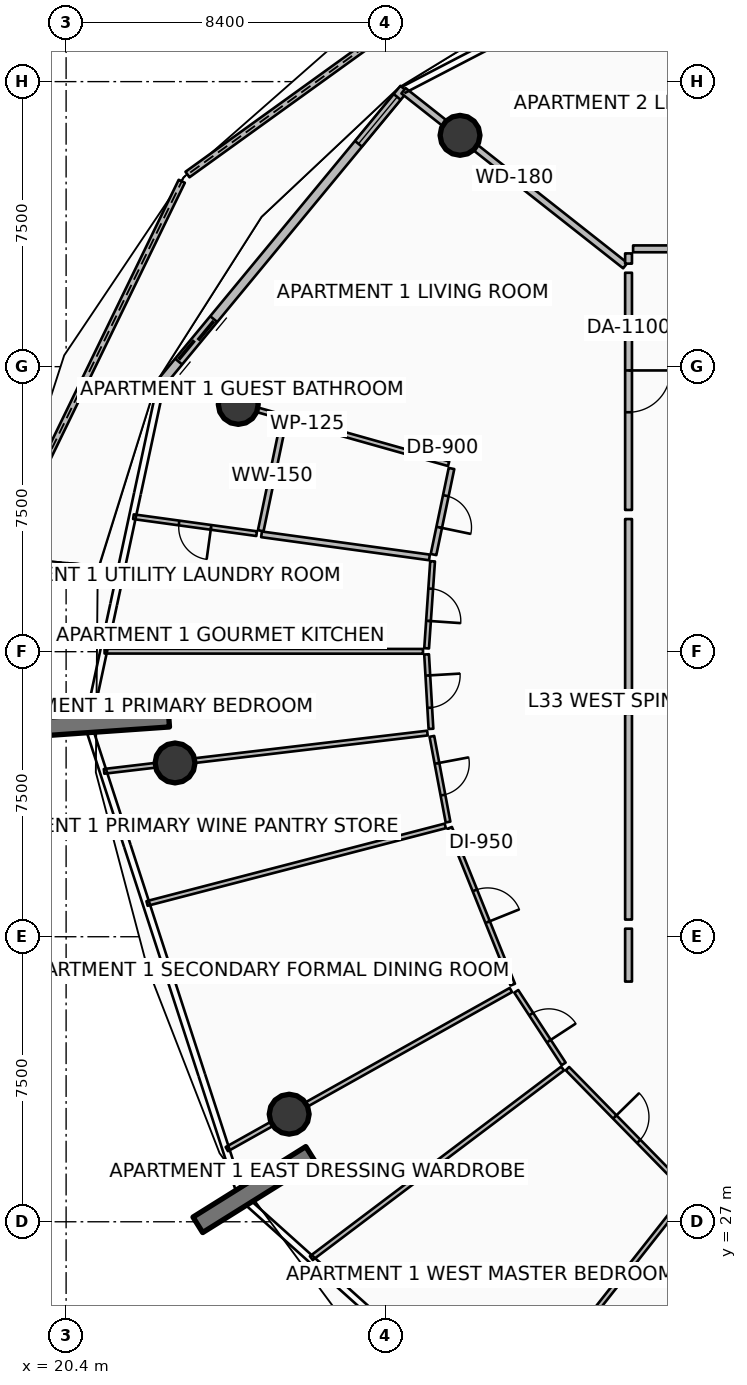
"""IFC4 building model, lengths in metres.
Left out: names, types, materials, properties, quantities, classifications, styles, units other than length and angle.
Written with IfcOpenShell. Run it as: python <this file> out.ifc"""

import sys

from ifc_helpers import new_model, si_unit, direction, frame, frame_2d, origin, origin_2d, place, context, subcontext, project, spatial, polyline, rectangle, circle, outline, extrude, element, fill, save


model = new_model("IFC4")
c1 = context("Model", 3, precision=1e-05, world=origin(), true_north=direction((0.0, 1.0)))
c2 = subcontext(c1, "Body", "Model", "MODEL_VIEW")
j1 = project(units=[si_unit("LENGTHUNIT", "METRE"), si_unit("PLANEANGLEUNIT", "RADIAN")], contexts=[c1])
p1 = place(None, origin())
s1 = spatial("IfcSite", under=j1, at=p1, CompositionType="ELEMENT")
p2 = place(p1, origin())
s2 = spatial("IfcBuilding", under=s1, at=p2, CompositionType="ELEMENT")
p3 = place(p2, frame((0.0, 0.0, 135.3)))
s3 = spatial("IfcBuildingStorey", under=s2, at=p3, CompositionType="ELEMENT", Elevation=135.3)
for number, where, z_axis, x_axis in (
    (1, (23.103, 40.259, 0.0), (0.0, 0.0, 1.0), (-0.998, -0.07, 0.0)),
    (2, (26.835, 28.774, 0.0), (0.0, 0.0, 1.0), (-0.848, -0.53, 0.0)),
):
    element("IfcWall", number, at=place(p3, frame(where, z_axis=z_axis, x_axis=x_axis)), inside=s3, PredefinedType="SOLIDWALL", context=c2, shape_type="SweptSolid", body=[
        extrude(rectangle(XDim=3.5, YDim=0.48, at=frame_2d((1.75, 0.0))), origin(), (0.0, 0.0, 1.0), 3.75),
    ])
for number, where, z_axis, x_axis in (
    (3, (30.766, 55.586, 0.0), (0.0, 0.0, 1.0), (1.0, 0.0, 0.0)),
    (4, (24.93, 48.506, 0.0), (0.0, 0.0, 1.0), (1.0, 0.0, 0.0)),
    (5, (23.267, 39.073, 0.0), (0.0, 0.0, 1.0), (1.0, 0.0, 0.0)),
    (6, (26.27, 29.831, 0.0), (0.0, 0.0, 1.0), (1.0, 0.0, 0.0)),
):
    element("IfcColumn", number, at=place(p3, frame(where, z_axis=z_axis, x_axis=x_axis)), inside=s3, PredefinedType="COLUMN", context=c2, shape_type="SweptSolid", body=[
        extrude(circle(Radius=0.525, at=origin_2d()), origin(), (0.0, 0.0, 1.0), 3.5),
    ])
p4 = place(p3, frame((31.942, 60.57, 0.0), z_axis=(0.0, 0.0, 1.0), x_axis=(-0.811363748486, -0.584541587608, 0.0)))
e7 = element("IfcWall", 7, at=p4, inside=s3, PredefinedType="PARAPET", context=c2, shape_type="SweptSolid", body=[
    extrude(outline(polyline([(0.0, 0.0), (10.29, 0.0), (10.29, 1.632), (5.145, 1.418), (0.0, 1.233), (0.0, 0.0)])), frame((0.0, 0.09, 0.0), z_axis=(0.0, -1.0, 0.0), x_axis=(1.0, 0.0, 0.0)), (0.0, 0.0, 1.0), 0.18),
])
p5 = place(p3, frame((23.444, 54.377, 0.0), z_axis=(0.0, 0.0, 1.0), x_axis=(-0.437208925246, -0.899359970026, 0.0)))
e8 = element("IfcWall", 8, at=p5, inside=s3, PredefinedType="PARAPET", context=c2, shape_type="SweptSolid", body=[
    extrude(outline(polyline([(0.0, 0.0), (10.992, 0.0), (10.992, 1.86), (5.496, 1.798), (0.0, 1.632), (0.0, 0.0)])), frame((0.0, 0.09, 0.0), z_axis=(0.0, -1.0, 0.0), x_axis=(1.0, 0.0, 0.0)), (0.0, 0.0, 1.0), 0.18),
])
p6 = place(p3, frame((29.291, 56.813, 0.0), z_axis=(0.0, 0.0, 1.0), x_axis=(-0.636771922292, -0.77105221547, 0.0)))
e9 = element("IfcWall", 9, at=p6, inside=s3, PredefinedType="SOLIDWALL", context=c2, shape_type="SweptSolid", body=[
    extrude(rectangle(XDim=10.082, YDim=0.24, at=frame_2d((5.041, 0.0))), origin(), (0.0, 0.0, 1.0), 2.45),
])
p7 = place(p6, frame((7.862, 0.0, 0.0)))
e10 = element("IfcOpeningElement", 10, at=p7, cuts=e9, PredefinedType="OPENING", context=c2, shape_type="SweptSolid", body=[
    extrude(rectangle(XDim=1.45, YDim=2.15, at=frame_2d((0.725, 1.075))), frame((0.0, 0.13, 0.0), z_axis=(0.0, -1.0, 0.0), x_axis=(1.0, 0.0, 0.0)), (0.0, 0.0, 1.0), 0.26),
])
p8 = place(p6, frame((0.28, 0.0, 0.65)))
e11 = element("IfcOpeningElement", 11, at=p8, cuts=e9, PredefinedType="OPENING", context=c2, shape_type="SweptSolid", body=[
    extrude(rectangle(XDim=1.6, YDim=1.5, at=frame_2d((0.8, 0.75))), frame((0.0, 0.13, 0.0), z_axis=(0.0, -1.0, 0.0), x_axis=(1.0, 0.0, 0.0)), (0.0, 0.0, 1.0), 0.26),
])
p9 = place(p3, frame((35.114, 52.159, 0.0), z_axis=(0.0, 0.0, 1.0), x_axis=(-0.78531739611, 0.619093359169, 0.0)))
e12 = element("IfcWall", 12, at=p9, inside=s3, PredefinedType="PARTITIONING", context=c2, shape_type="SweptSolid", body=[
    extrude(rectangle(XDim=7.43, YDim=0.18, at=frame_2d((3.715, 0.0))), origin(), (0.0, 0.0, 1.0), 2.94),
])
p10 = place(p3, frame((35.2, 51.971, 0.0), z_axis=(0.0, 0.0, 1.0), x_axis=(0.0, -1.0, 0.0)))
e13 = element("IfcWall", 13, at=p10, inside=s3, PredefinedType="PARTITIONING", context=c2, shape_type="SweptSolid", body=[
    extrude(rectangle(XDim=6.241, YDim=0.18, at=frame_2d((3.12, 0.0))), origin(), (0.0, 0.0, 1.0), 2.94),
])
p11 = place(p10, frame((2.57, 0.0, 0.0)))
e14 = element("IfcOpeningElement", 14, at=p11, cuts=e13, PredefinedType="OPENING", context=c2, shape_type="SweptSolid", body=[
    extrude(rectangle(XDim=1.1, YDim=2.1, at=frame_2d((0.55, 1.05))), frame((0.0, 0.1, 0.0), z_axis=(0.0, -1.0, 0.0), x_axis=(1.0, 0.0, 0.0)), (0.0, 0.0, 1.0), 0.2),
])
p12 = place(p3, frame((35.2, 45.49, 0.0), z_axis=(0.0, 0.0, 1.0), x_axis=(0.0, -1.0, 0.0)))
e15 = element("IfcWall", 15, at=p12, inside=s3, PredefinedType="PARTITIONING", context=c2, shape_type="SweptSolid", body=[
    extrude(rectangle(XDim=4.885, YDim=0.18, at=frame_2d((2.442, 0.0))), origin(), (0.0, 0.0, 1.0), 2.94),
])
p13 = place(p3, frame((30.465, 46.945, 0.0), z_axis=(0.0, 0.0, 1.0), x_axis=(-0.962456021196, 0.271437667363, 0.0)))
e16 = element("IfcWall", 16, at=p13, inside=s3, PredefinedType="PARTITIONING", context=c2, shape_type="SweptSolid", body=[
    extrude(rectangle(XDim=7.732, YDim=0.125, at=frame_2d((3.866, 0.0))), origin(), (0.0, 0.0, 1.0), 2.94),
])
p14 = place(p3, frame((30.541, 46.82, 0.0), z_axis=(0.0, 0.0, 1.0), x_axis=(-0.20437157278, -0.978893385533, 0.0)))
e17 = element("IfcWall", 17, at=p14, inside=s3, PredefinedType="PARTITIONING", context=c2, shape_type="SweptSolid", body=[
    extrude(rectangle(XDim=2.313, YDim=0.15, at=frame_2d((1.156, 0.0))), origin(), (0.0, 0.0, 1.0), 2.94),
])
p15 = place(p14, frame((0.731, 0.0, 0.0)))
e18 = element("IfcOpeningElement", 18, at=p15, cuts=e17, PredefinedType="OPENING", context=c2, shape_type="SweptSolid", body=[
    extrude(rectangle(XDim=0.85, YDim=2.06, at=frame_2d((0.425, 1.03))), frame((0.0, 0.085, 0.0), z_axis=(0.0, -1.0, 0.0), x_axis=(1.0, 0.0, 0.0)), (0.0, 0.0, 1.0), 0.17),
])
p16 = place(p3, frame((26.123, 48.066, 0.0), z_axis=(0.0, 0.0, 1.0), x_axis=(-0.204410847423, -0.978885185022, 0.0)))
e19 = element("IfcWall", 19, at=p16, inside=s3, PredefinedType="PARTITIONING", context=c2, shape_type="SweptSolid", body=[
    extrude(rectangle(XDim=2.947, YDim=0.15, at=frame_2d((1.473, 0.0))), origin(), (0.0, 0.0, 1.0), 2.94),
])
p17 = place(p3, frame((29.961, 44.481, 0.0), z_axis=(0.0, 0.0, 1.0), x_axis=(-0.99067496126, 0.136246545396, 0.0)))
e20 = element("IfcWall", 20, at=p17, inside=s3, PredefinedType="PARTITIONING", context=c2, shape_type="SweptSolid", body=[
    extrude(rectangle(XDim=4.46, YDim=0.15, at=frame_2d((2.23, 0.0))), origin(), (0.0, 0.0, 1.0), 2.94),
])
p18 = place(p3, frame((25.414, 45.106, 0.0), z_axis=(0.0, 0.0, 1.0), x_axis=(-0.990676070786, 0.136238477576, 0.0)))
e21 = element("IfcWall", 21, at=p18, inside=s3, PredefinedType="PARTITIONING", context=c2, shape_type="SweptSolid", body=[
    extrude(rectangle(XDim=3.272, YDim=0.125, at=frame_2d((1.636, 0.0))), origin(), (0.0, 0.0, 1.0), 2.94),
])
p19 = place(p18, frame((1.211, 0.0, 0.0)))
e22 = element("IfcOpeningElement", 22, at=p19, cuts=e21, PredefinedType="OPENING", context=c2, shape_type="SweptSolid", body=[
    extrude(rectangle(XDim=0.85, YDim=2.06, at=frame_2d((0.425, 1.03))), frame((0.0, 0.073, 0.0), z_axis=(0.0, -1.0, 0.0), x_axis=(1.0, 0.0, 0.0)), (0.0, 0.0, 1.0), 0.145),
])
p20 = place(p3, frame((29.791, 42.01, 0.0), z_axis=(0.0, 0.0, 1.0), x_axis=(-0.999999862447, 0.000524506018, 0.0)))
e23 = element("IfcWall", 23, at=p20, inside=s3, PredefinedType="PARTITIONING", context=c2, shape_type="SweptSolid", body=[
    extrude(rectangle(XDim=8.378, YDim=0.125, at=frame_2d((4.189, 0.0))), origin(), (0.0, 0.0, 1.0), 2.94),
])
p21 = place(p3, frame((30.044, 44.379, 0.0), z_axis=(0.0, 0.0, 1.0), x_axis=(-0.068510010266, -0.997650429005, 0.0)))
e24 = element("IfcWall", 24, at=p21, inside=s3, PredefinedType="PARTITIONING", context=c2, shape_type="SweptSolid", body=[
    extrude(rectangle(XDim=2.295, YDim=0.125, at=frame_2d((1.147, 0.0))), origin(), (0.0, 0.0, 1.0), 2.94),
])
p22 = place(p21, frame((0.722, 0.0, 0.0)))
e25 = element("IfcOpeningElement", 25, at=p22, cuts=e24, PredefinedType="OPENING", context=c2, shape_type="SweptSolid", body=[
    extrude(rectangle(XDim=0.85, YDim=2.06, at=frame_2d((0.425, 1.03))), frame((0.0, 0.073, 0.0), z_axis=(0.0, -1.0, 0.0), x_axis=(1.0, 0.0, 0.0)), (0.0, 0.0, 1.0), 0.145),
])
p23 = place(p3, frame((29.886, 41.929, 0.0), z_axis=(0.0, 0.0, 1.0), x_axis=(0.058590761666, -0.998282085709, 0.0)))
e26 = element("IfcWall", 26, at=p23, inside=s3, PredefinedType="PARTITIONING", context=c2, shape_type="SweptSolid", body=[
    extrude(rectangle(XDim=1.963, YDim=0.125, at=frame_2d((0.981, 0.0))), origin(), (0.0, 0.0, 1.0), 2.94),
])
p24 = place(p23, frame((0.556, 0.0, 0.0)))
e27 = element("IfcOpeningElement", 27, at=p24, cuts=e26, PredefinedType="OPENING", context=c2, shape_type="SweptSolid", body=[
    extrude(rectangle(XDim=0.85, YDim=2.06, at=frame_2d((0.425, 1.03))), frame((0.0, 0.073, 0.0), z_axis=(0.0, -1.0, 0.0), x_axis=(1.0, 0.0, 0.0)), (0.0, 0.0, 1.0), 0.145),
])
p25 = place(p3, frame((35.2, 40.365, 0.0), z_axis=(0.0, 0.0, 1.0), x_axis=(0.0, -1.0, 0.0)))
e28 = element("IfcWall", 28, at=p25, inside=s3, PredefinedType="PARTITIONING", context=c2, shape_type="SweptSolid", body=[
    extrude(rectangle(XDim=5.413, YDim=0.18, at=frame_2d((2.707, 0.0))), origin(), (0.0, 0.0, 1.0), 2.94),
])
p26 = place(p3, frame((29.907, 39.858, 0.0), z_axis=(0.0, 0.0, 1.0), x_axis=(-0.993070228419, -0.117522429465, 0.0)))
e29 = element("IfcWall", 29, at=p26, inside=s3, PredefinedType="PARTITIONING", context=c2, shape_type="SweptSolid", body=[
    extrude(rectangle(XDim=8.567, YDim=0.125, at=frame_2d((4.284, 0.0))), origin(), (0.0, 0.0, 1.0), 2.94),
])
p27 = place(p3, frame((30.377, 37.416, 0.0), z_axis=(0.0, 0.0, 1.0), x_axis=(-0.967798305948, -0.251726913549, 0.0)))
e30 = element("IfcWall", 30, at=p27, inside=s3, PredefinedType="PARTITIONING", context=c2, shape_type="SweptSolid", body=[
    extrude(rectangle(XDim=8.109, YDim=0.125, at=frame_2d((4.055, 0.0))), origin(), (0.0, 0.0, 1.0), 2.94),
])
p28 = place(p3, frame((30.025, 39.772, 0.0), z_axis=(0.0, 0.0, 1.0), x_axis=(0.185072404157, -0.98272488786, 0.0)))
e31 = element("IfcWall", 31, at=p28, inside=s3, PredefinedType="PARTITIONING", context=c2, shape_type="SweptSolid", body=[
    extrude(rectangle(XDim=2.294, YDim=0.125, at=frame_2d((1.147, 0.0))), origin(), (0.0, 0.0, 1.0), 2.94),
])
p29 = place(p28, frame((0.722, 0.0, 0.0)))
e32 = element("IfcOpeningElement", 32, at=p29, cuts=e31, PredefinedType="OPENING", context=c2, shape_type="SweptSolid", body=[
    extrude(rectangle(XDim=0.85, YDim=2.06, at=frame_2d((0.425, 1.03))), frame((0.0, 0.073, 0.0), z_axis=(0.0, -1.0, 0.0), x_axis=(1.0, 0.0, 0.0)), (0.0, 0.0, 1.0), 0.145),
])
p30 = place(p3, frame((30.494, 37.365, 0.0), z_axis=(0.0, 0.0, 1.0), x_axis=(0.373198093248, -0.927751681861, 0.0)))
e33 = element("IfcWall", 33, at=p30, inside=s3, PredefinedType="PARTITIONING", context=c2, shape_type="SweptSolid", body=[
    extrude(rectangle(XDim=4.447, YDim=0.125, at=frame_2d((2.223, 0.0))), origin(), (0.0, 0.0, 1.0), 2.94),
])
p31 = place(p30, frame((1.773, 0.0, 0.0)))
e34 = element("IfcOpeningElement", 34, at=p31, cuts=e33, PredefinedType="OPENING", context=c2, shape_type="SweptSolid", body=[
    extrude(rectangle(XDim=0.9, YDim=2.08, at=frame_2d((0.45, 1.04))), frame((0.0, 0.073, 0.0), z_axis=(0.0, -1.0, 0.0), x_axis=(1.0, 0.0, 0.0)), (0.0, 0.0, 1.0), 0.145),
])
p32 = place(p3, frame((35.2, 34.712, 0.0), z_axis=(0.0, 0.0, 1.0), x_axis=(0.0, -1.0, 0.0)))
e35 = element("IfcWall", 35, at=p32, inside=s3, PredefinedType="PARTITIONING", context=c2, shape_type="SweptSolid", body=[
    extrude(rectangle(XDim=1.392, YDim=0.18, at=frame_2d((0.696, 0.0))), origin(), (0.0, 0.0, 1.0), 2.94),
])
p33 = place(p3, frame((32.104, 33.098, 0.0), z_axis=(0.0, 0.0, 1.0), x_axis=(-0.872488035617, -0.488635475283, 0.0)))
e36 = element("IfcWall", 36, at=p33, inside=s3, PredefinedType="PARTITIONING", context=c2, shape_type="SweptSolid", body=[
    extrude(rectangle(XDim=8.567, YDim=0.125, at=frame_2d((4.284, 0.0))), origin(), (0.0, 0.0, 1.0), 2.94),
])
p34 = place(p3, frame((33.464, 31.033, 0.0), z_axis=(0.0, 0.0, 1.0), x_axis=(-0.798260006805, -0.602313009602, 0.0)))
e37 = element("IfcWall", 37, at=p34, inside=s3, PredefinedType="PARTITIONING", context=c2, shape_type="SweptSolid", body=[
    extrude(rectangle(XDim=8.283, YDim=0.125, at=frame_2d((4.142, 0.0))), origin(), (0.0, 0.0, 1.0), 2.94),
])
p35 = place(p3, frame((32.246, 33.063, 0.0), z_axis=(0.0, 0.0, 1.0), x_axis=(0.54671843355, -0.837316519852, 0.0)))
e38 = element("IfcWall", 38, at=p35, inside=s3, PredefinedType="PARTITIONING", context=c2, shape_type="SweptSolid", body=[
    extrude(rectangle(XDim=2.28, YDim=0.125, at=frame_2d((1.14, 0.0))), origin(), (0.0, 0.0, 1.0), 2.94),
])
p36 = place(p35, frame((0.715, 0.0, 0.0)))
e39 = element("IfcOpeningElement", 39, at=p36, cuts=e38, PredefinedType="OPENING", context=c2, shape_type="SweptSolid", body=[
    extrude(rectangle(XDim=0.85, YDim=2.06, at=frame_2d((0.425, 1.03))), frame((0.0, 0.073, 0.0), z_axis=(0.0, -1.0, 0.0), x_axis=(1.0, 0.0, 0.0)), (0.0, 0.0, 1.0), 0.145),
])
p37 = place(p3, frame((33.592, 31.03, 0.0), z_axis=(0.0, 0.0, 1.0), x_axis=(0.699540960256, -0.714592502707, 0.0)))
e40 = element("IfcWall", 40, at=p37, inside=s3, PredefinedType="PARTITIONING", context=c2, shape_type="SweptSolid", body=[
    extrude(rectangle(XDim=4.461, YDim=0.125, at=frame_2d((2.23, 0.0))), origin(), (0.0, 0.0, 1.0), 2.94),
])
p38 = place(p37, frame((1.78, 0.0, 0.0)))
e41 = element("IfcOpeningElement", 41, at=p38, cuts=e40, PredefinedType="OPENING", context=c2, shape_type="SweptSolid", body=[
    extrude(rectangle(XDim=0.9, YDim=2.08, at=frame_2d((0.45, 1.04))), frame((0.0, 0.073, 0.0), z_axis=(0.0, -1.0, 0.0), x_axis=(1.0, 0.0, 0.0)), (0.0, 0.0, 1.0), 0.145),
])
p39 = place(p3, frame((36.721, 27.692, 0.0), z_axis=(0.0, 0.0, 1.0), x_axis=(-0.619091325953, -0.785318998962, 0.0)))
e42 = element("IfcWall", 42, at=p39, inside=s3, PredefinedType="PARTITIONING", context=c2, shape_type="SweptSolid", body=[
    extrude(rectangle(XDim=7.833, YDim=0.125, at=frame_2d((3.917, 0.0))), origin(), (0.0, 0.0, 1.0), 2.94),
])
p40 = place(p3, frame((41.944, 52.6, 0.0), z_axis=(0.0, 0.0, 1.0), x_axis=(-1.0, 0.0, 0.0)))
e43 = element("IfcWall", 43, at=p40, inside=s3, PredefinedType="PARTITIONING", context=c2, shape_type="SweptSolid", body=[
    extrude(rectangle(XDim=6.624, YDim=0.18, at=frame_2d((3.312, 0.0))), origin(), (0.0, 0.0, 1.0), 2.94),
])
p41 = place(p40, frame((2.762, 0.0, 0.0)))
e44 = element("IfcOpeningElement", 44, at=p41, cuts=e43, PredefinedType="OPENING", context=c2, shape_type="SweptSolid", body=[
    extrude(rectangle(XDim=1.1, YDim=2.1, at=frame_2d((0.55, 1.05))), frame((0.0, 0.1, 0.0), z_axis=(0.0, -1.0, 0.0), x_axis=(1.0, 0.0, 0.0)), (0.0, 0.0, 1.0), 0.2),
])
p42 = place(p3, frame((35.2, 52.48, 0.0), z_axis=(0.0, 0.0, 1.0), x_axis=(0.0, -1.0, 0.0)))
e45 = element("IfcWall", 45, at=p42, inside=s3, PredefinedType="PARTITIONING", context=c2, shape_type="SweptSolid", body=[
    extrude(rectangle(XDim=0.269, YDim=0.18, at=frame_2d((0.135, 0.0))), origin(), (0.0, 0.0, 1.0), 2.94),
])
p43 = place(p7, origin())
e46 = element("IfcDoor", 46, at=p43, inside=s3, OperationType="DOUBLE_DOOR_SLIDING", PredefinedType="DOOR", context=c2, shape_type="SweptSolid", body=[
    extrude(rectangle(XDim=1.45, YDim=2.15, at=frame_2d((0.725, 1.075))), frame((0.0, 0.025, 0.0), z_axis=(0.0, -1.0, 0.0), x_axis=(1.0, 0.0, 0.0)), (0.0, 0.0, 1.0), 0.05),
])
fill(e10, e46)
p44 = place(p8, origin())
e47 = element("IfcWindow", 47, at=p44, inside=s3, PartitioningType="SINGLE_PANEL", PredefinedType="WINDOW", context=c2, shape_type="SweptSolid", body=[
    extrude(rectangle(XDim=1.6, YDim=1.5, at=frame_2d((0.8, 0.75))), frame((0.0, 0.03, 0.0), z_axis=(0.0, -1.0, 0.0), x_axis=(1.0, 0.0, 0.0)), (0.0, 0.0, 1.0), 0.06),
])
fill(e11, e47)
p45 = place(p11, origin())
e48 = element("IfcDoor", 48, at=p45, inside=s3, OperationType="SINGLE_SWING_LEFT", PredefinedType="DOOR", context=c2, shape_type="SweptSolid", body=[
    extrude(rectangle(XDim=1.1, YDim=2.1, at=frame_2d((0.55, 1.05))), frame((0.0, 0.025, 0.0), z_axis=(0.0, -1.0, 0.0), x_axis=(1.0, 0.0, 0.0)), (0.0, 0.0, 1.0), 0.05),
])
fill(e14, e48)
p46 = place(p15, origin())
e49 = element("IfcDoor", 49, at=p46, inside=s3, OperationType="SINGLE_SWING_RIGHT", PredefinedType="DOOR", context=c2, shape_type="SweptSolid", body=[
    extrude(rectangle(XDim=0.85, YDim=2.06, at=frame_2d((0.425, 1.03))), frame((0.0, 0.025, 0.0), z_axis=(0.0, -1.0, 0.0), x_axis=(1.0, 0.0, 0.0)), (0.0, 0.0, 1.0), 0.05),
])
fill(e18, e49)
p47 = place(p19, origin())
e50 = element("IfcDoor", 50, at=p47, inside=s3, OperationType="SINGLE_SWING_LEFT", PredefinedType="DOOR", context=c2, shape_type="SweptSolid", body=[
    extrude(rectangle(XDim=0.85, YDim=2.06, at=frame_2d((0.425, 1.03))), frame((0.0, 0.025, 0.0), z_axis=(0.0, -1.0, 0.0), x_axis=(1.0, 0.0, 0.0)), (0.0, 0.0, 1.0), 0.05),
])
fill(e22, e50)
p48 = place(p22, origin())
e51 = element("IfcDoor", 51, at=p48, inside=s3, OperationType="SINGLE_SWING_RIGHT", PredefinedType="DOOR", context=c2, shape_type="SweptSolid", body=[
    extrude(rectangle(XDim=0.85, YDim=2.06, at=frame_2d((0.425, 1.03))), frame((0.0, 0.025, 0.0), z_axis=(0.0, -1.0, 0.0), x_axis=(1.0, 0.0, 0.0)), (0.0, 0.0, 1.0), 0.05),
])
fill(e25, e51)
p49 = place(p24, origin())
e52 = element("IfcDoor", 52, at=p49, inside=s3, OperationType="SINGLE_SWING_LEFT", PredefinedType="DOOR", context=c2, shape_type="SweptSolid", body=[
    extrude(rectangle(XDim=0.85, YDim=2.06, at=frame_2d((0.425, 1.03))), frame((0.0, 0.025, 0.0), z_axis=(0.0, -1.0, 0.0), x_axis=(1.0, 0.0, 0.0)), (0.0, 0.0, 1.0), 0.05),
])
fill(e27, e52)
p50 = place(p29, origin())
e53 = element("IfcDoor", 53, at=p50, inside=s3, OperationType="SINGLE_SWING_LEFT", PredefinedType="DOOR", context=c2, shape_type="SweptSolid", body=[
    extrude(rectangle(XDim=0.85, YDim=2.06, at=frame_2d((0.425, 1.03))), frame((0.0, 0.025, 0.0), z_axis=(0.0, -1.0, 0.0), x_axis=(1.0, 0.0, 0.0)), (0.0, 0.0, 1.0), 0.05),
])
fill(e32, e53)
p51 = place(p31, origin())
e54 = element("IfcDoor", 54, at=p51, inside=s3, OperationType="SINGLE_SWING_RIGHT", PredefinedType="DOOR", context=c2, shape_type="SweptSolid", body=[
    extrude(rectangle(XDim=0.9, YDim=2.08, at=frame_2d((0.45, 1.04))), frame((0.0, 0.025, 0.0), z_axis=(0.0, -1.0, 0.0), x_axis=(1.0, 0.0, 0.0)), (0.0, 0.0, 1.0), 0.05),
])
fill(e34, e54)
p52 = place(p36, origin())
e55 = element("IfcDoor", 55, at=p52, inside=s3, OperationType="SINGLE_SWING_RIGHT", PredefinedType="DOOR", context=c2, shape_type="SweptSolid", body=[
    extrude(rectangle(XDim=0.85, YDim=2.06, at=frame_2d((0.425, 1.03))), frame((0.0, 0.025, 0.0), z_axis=(0.0, -1.0, 0.0), x_axis=(1.0, 0.0, 0.0)), (0.0, 0.0, 1.0), 0.05),
])
fill(e39, e55)
p53 = place(p38, origin())
e56 = element("IfcDoor", 56, at=p53, inside=s3, OperationType="SINGLE_SWING_LEFT", PredefinedType="DOOR", context=c2, shape_type="SweptSolid", body=[
    extrude(rectangle(XDim=0.9, YDim=2.08, at=frame_2d((0.45, 1.04))), frame((0.0, 0.025, 0.0), z_axis=(0.0, -1.0, 0.0), x_axis=(1.0, 0.0, 0.0)), (0.0, 0.0, 1.0), 0.05),
])
fill(e41, e56)
save(model, sys.argv[1])
